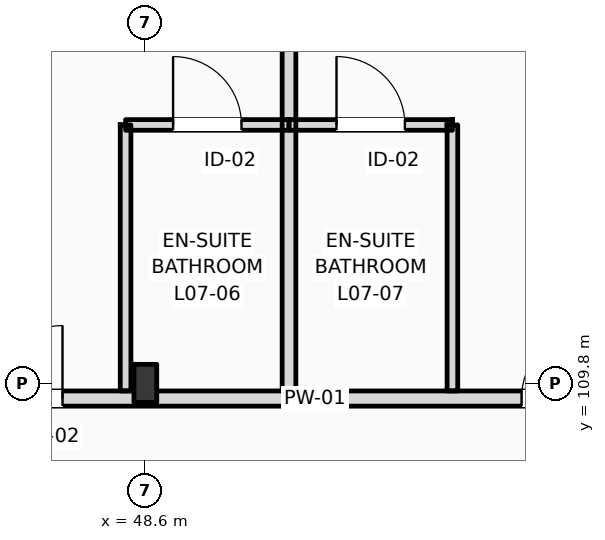
"""IFC4 building model, lengths in metres.
Left out: names, types, materials, properties, quantities, classifications, styles, units other than length and angle.
Written with IfcOpenShell. Run it as: python <this file> out.ifc"""

import sys

from ifc_helpers import new_model, si_unit, direction, frame, frame_2d, origin, origin_2d, place, context, subcontext, project, spatial, rectangle, i_section, extrude, element, fill, save


model = new_model("IFC4")
c1 = context("Model", 3, precision=1e-05, world=origin(), true_north=direction((0.0, 1.0)))
c2 = subcontext(c1, "Body", "Model", "MODEL_VIEW")
j1 = project(units=[si_unit("LENGTHUNIT", "METRE"), si_unit("PLANEANGLEUNIT", "RADIAN")], contexts=[c1])
p1 = place(None, origin())
s1 = spatial("IfcSite", under=j1, at=p1, CompositionType="ELEMENT")
p2 = place(p1, origin())
s2 = spatial("IfcBuilding", under=s1, at=p2, CompositionType="ELEMENT")
p3 = place(p2, frame((0.0, 0.0, 31.8)))
s3 = spatial("IfcBuildingStorey", under=s2, at=p3, CompositionType="ELEMENT", Elevation=31.8)
p4 = place(p3, frame((48.6, 109.8, 0.0), z_axis=(0.0, 0.0, 1.0), x_axis=(1.0, 0.0, 0.0)))
e1 = element("IfcColumn", 1, at=p4, inside=s3, PredefinedType="COLUMN", context=c2, shape_type="SweptSolid", body=[
    extrude(i_section(OverallWidth=0.3, OverallDepth=0.5, WebThickness=0.014, FlangeThickness=0.028, FilletRadius=0.027, at=origin_2d()), origin(), (0.0, 0.0, 1.0), 3.6),
])
p5 = place(p3, frame((10.65, 109.6, 0.0), z_axis=(0.0, 0.0, 1.0), x_axis=(1.0, 0.0, 0.0)))
e2 = element("IfcWall", 2, at=p5, inside=s3, PredefinedType="PARTITIONING", context=c2, shape_type="SweptSolid", body=[
    extrude(rectangle(XDim=109.21, YDim=0.2, at=frame_2d((54.605, 0.0))), origin(), (0.0, 0.0, 1.0), 2.72),
])
p6 = place(p5, frame((15.825, 0.0, 0.0)))
e3 = element("IfcOpeningElement", 3, at=p6, cuts=e2, PredefinedType="OPENING", context=c2, shape_type="SweptSolid", body=[
    extrude(rectangle(XDim=1.02, YDim=2.2, at=frame_2d((0.51, 1.1))), frame((0.0, 0.11, 0.0), z_axis=(0.0, -1.0, 0.0), x_axis=(1.0, 0.0, 0.0)), (0.0, 0.0, 1.0), 0.22),
])
p7 = place(p5, frame((19.87, 0.0, 0.0)))
e4 = element("IfcOpeningElement", 4, at=p7, cuts=e2, PredefinedType="OPENING", context=c2, shape_type="SweptSolid", body=[
    extrude(rectangle(XDim=1.02, YDim=2.2, at=frame_2d((0.51, 1.1))), frame((0.0, 0.11, 0.0), z_axis=(0.0, -1.0, 0.0), x_axis=(1.0, 0.0, 0.0)), (0.0, 0.0, 1.0), 0.22),
])
p8 = place(p5, frame((24.47, 0.0, 0.0)))
e5 = element("IfcOpeningElement", 5, at=p8, cuts=e2, PredefinedType="OPENING", context=c2, shape_type="SweptSolid", body=[
    extrude(rectangle(XDim=1.02, YDim=2.2, at=frame_2d((0.51, 1.1))), frame((0.0, 0.11, 0.0), z_axis=(0.0, -1.0, 0.0), x_axis=(1.0, 0.0, 0.0)), (0.0, 0.0, 1.0), 0.22),
])
p9 = place(p5, frame((26.92, 0.0, 0.0)))
e6 = element("IfcOpeningElement", 6, at=p9, cuts=e2, PredefinedType="OPENING", context=c2, shape_type="SweptSolid", body=[
    extrude(rectangle(XDim=1.02, YDim=2.2, at=frame_2d((0.51, 1.1))), frame((0.0, 0.11, 0.0), z_axis=(0.0, -1.0, 0.0), x_axis=(1.0, 0.0, 0.0)), (0.0, 0.0, 1.0), 0.22),
])
p10 = place(p5, frame((33.7, 0.0, 0.0)))
e7 = element("IfcOpeningElement", 7, at=p10, cuts=e2, PredefinedType="OPENING", context=c2, shape_type="SweptSolid", body=[
    extrude(rectangle(XDim=0.96, YDim=2.2, at=frame_2d((0.48, 1.1))), frame((0.0, 0.11, 0.0), z_axis=(0.0, -1.0, 0.0), x_axis=(1.0, 0.0, 0.0)), (0.0, 0.0, 1.0), 0.22),
])
p11 = place(p5, frame((35.9, 0.0, 0.0)))
e8 = element("IfcOpeningElement", 8, at=p11, cuts=e2, PredefinedType="OPENING", context=c2, shape_type="SweptSolid", body=[
    extrude(rectangle(XDim=0.96, YDim=2.2, at=frame_2d((0.48, 1.1))), frame((0.0, 0.11, 0.0), z_axis=(0.0, -1.0, 0.0), x_axis=(1.0, 0.0, 0.0)), (0.0, 0.0, 1.0), 0.22),
])
p12 = place(p5, frame((42.9, 0.0, 0.0)))
e9 = element("IfcOpeningElement", 9, at=p12, cuts=e2, PredefinedType="OPENING", context=c2, shape_type="SweptSolid", body=[
    extrude(rectangle(XDim=0.96, YDim=2.2, at=frame_2d((0.48, 1.1))), frame((0.0, 0.11, 0.0), z_axis=(0.0, -1.0, 0.0), x_axis=(1.0, 0.0, 0.0)), (0.0, 0.0, 1.0), 0.22),
])
p13 = place(p5, frame((47.5, 0.0, 0.0)))
e10 = element("IfcOpeningElement", 10, at=p13, cuts=e2, PredefinedType="OPENING", context=c2, shape_type="SweptSolid", body=[
    extrude(rectangle(XDim=0.96, YDim=2.2, at=frame_2d((0.48, 1.1))), frame((0.0, 0.11, 0.0), z_axis=(0.0, -1.0, 0.0), x_axis=(1.0, 0.0, 0.0)), (0.0, 0.0, 1.0), 0.22),
])
p14 = place(p5, frame((49.95, 0.0, 0.0)))
e11 = element("IfcOpeningElement", 11, at=p14, cuts=e2, PredefinedType="OPENING", context=c2, shape_type="SweptSolid", body=[
    extrude(rectangle(XDim=0.96, YDim=2.2, at=frame_2d((0.48, 1.1))), frame((0.0, 0.11, 0.0), z_axis=(0.0, -1.0, 0.0), x_axis=(1.0, 0.0, 0.0)), (0.0, 0.0, 1.0), 0.22),
])
p15 = place(p5, frame((56.7, 0.0, 0.0)))
e12 = element("IfcOpeningElement", 12, at=p15, cuts=e2, PredefinedType="OPENING", context=c2, shape_type="SweptSolid", body=[
    extrude(rectangle(XDim=0.96, YDim=2.2, at=frame_2d((0.48, 1.1))), frame((0.0, 0.11, 0.0), z_axis=(0.0, -1.0, 0.0), x_axis=(1.0, 0.0, 0.0)), (0.0, 0.0, 1.0), 0.22),
])
p16 = place(p5, frame((59.15, 0.0, 0.0)))
e13 = element("IfcOpeningElement", 13, at=p16, cuts=e2, PredefinedType="OPENING", context=c2, shape_type="SweptSolid", body=[
    extrude(rectangle(XDim=0.96, YDim=2.2, at=frame_2d((0.48, 1.1))), frame((0.0, 0.11, 0.0), z_axis=(0.0, -1.0, 0.0), x_axis=(1.0, 0.0, 0.0)), (0.0, 0.0, 1.0), 0.22),
])
p17 = place(p5, frame((65.9, 0.0, 0.0)))
e14 = element("IfcOpeningElement", 14, at=p17, cuts=e2, PredefinedType="OPENING", context=c2, shape_type="SweptSolid", body=[
    extrude(rectangle(XDim=0.96, YDim=2.2, at=frame_2d((0.48, 1.1))), frame((0.0, 0.11, 0.0), z_axis=(0.0, -1.0, 0.0), x_axis=(1.0, 0.0, 0.0)), (0.0, 0.0, 1.0), 0.22),
])
p18 = place(p5, frame((70.5, 0.0, 0.0)))
e15 = element("IfcOpeningElement", 15, at=p18, cuts=e2, PredefinedType="OPENING", context=c2, shape_type="SweptSolid", body=[
    extrude(rectangle(XDim=0.96, YDim=2.2, at=frame_2d((0.48, 1.1))), frame((0.0, 0.11, 0.0), z_axis=(0.0, -1.0, 0.0), x_axis=(1.0, 0.0, 0.0)), (0.0, 0.0, 1.0), 0.22),
])
p19 = place(p5, frame((72.95, 0.0, 0.0)))
e16 = element("IfcOpeningElement", 16, at=p19, cuts=e2, PredefinedType="OPENING", context=c2, shape_type="SweptSolid", body=[
    extrude(rectangle(XDim=0.96, YDim=2.2, at=frame_2d((0.48, 1.1))), frame((0.0, 0.11, 0.0), z_axis=(0.0, -1.0, 0.0), x_axis=(1.0, 0.0, 0.0)), (0.0, 0.0, 1.0), 0.22),
])
p20 = place(p5, frame((79.7, 0.0, 0.0)))
e17 = element("IfcOpeningElement", 17, at=p20, cuts=e2, PredefinedType="OPENING", context=c2, shape_type="SweptSolid", body=[
    extrude(rectangle(XDim=0.96, YDim=2.2, at=frame_2d((0.48, 1.1))), frame((0.0, 0.11, 0.0), z_axis=(0.0, -1.0, 0.0), x_axis=(1.0, 0.0, 0.0)), (0.0, 0.0, 1.0), 0.22),
])
p21 = place(p5, frame((82.15, 0.0, 0.0)))
e18 = element("IfcOpeningElement", 18, at=p21, cuts=e2, PredefinedType="OPENING", context=c2, shape_type="SweptSolid", body=[
    extrude(rectangle(XDim=0.96, YDim=2.2, at=frame_2d((0.48, 1.1))), frame((0.0, 0.11, 0.0), z_axis=(0.0, -1.0, 0.0), x_axis=(1.0, 0.0, 0.0)), (0.0, 0.0, 1.0), 0.22),
])
p22 = place(p5, frame((88.9, 0.0, 0.0)))
e19 = element("IfcOpeningElement", 19, at=p22, cuts=e2, PredefinedType="OPENING", context=c2, shape_type="SweptSolid", body=[
    extrude(rectangle(XDim=0.96, YDim=2.2, at=frame_2d((0.48, 1.1))), frame((0.0, 0.11, 0.0), z_axis=(0.0, -1.0, 0.0), x_axis=(1.0, 0.0, 0.0)), (0.0, 0.0, 1.0), 0.22),
])
p23 = place(p5, frame((93.75, 0.0, 0.0)))
e20 = element("IfcOpeningElement", 20, at=p23, cuts=e2, PredefinedType="OPENING", context=c2, shape_type="SweptSolid", body=[
    extrude(rectangle(XDim=0.96, YDim=2.2, at=frame_2d((0.48, 1.1))), frame((0.0, 0.11, 0.0), z_axis=(0.0, -1.0, 0.0), x_axis=(1.0, 0.0, 0.0)), (0.0, 0.0, 1.0), 0.22),
])
p24 = place(p5, frame((98.1, 0.0, 0.0)))
e21 = element("IfcOpeningElement", 21, at=p24, cuts=e2, PredefinedType="OPENING", context=c2, shape_type="SweptSolid", body=[
    extrude(rectangle(XDim=0.96, YDim=2.2, at=frame_2d((0.48, 1.1))), frame((0.0, 0.11, 0.0), z_axis=(0.0, -1.0, 0.0), x_axis=(1.0, 0.0, 0.0)), (0.0, 0.0, 1.0), 0.22),
])
p25 = place(p5, frame((102.7, 0.0, 0.0)))
e22 = element("IfcOpeningElement", 22, at=p25, cuts=e2, PredefinedType="OPENING", context=c2, shape_type="SweptSolid", body=[
    extrude(rectangle(XDim=0.96, YDim=2.2, at=frame_2d((0.48, 1.1))), frame((0.0, 0.11, 0.0), z_axis=(0.0, -1.0, 0.0), x_axis=(1.0, 0.0, 0.0)), (0.0, 0.0, 1.0), 0.22),
])
p26 = place(p5, frame((105.04, 0.0, 0.0)))
e23 = element("IfcOpeningElement", 23, at=p26, cuts=e2, PredefinedType="OPENING", context=c2, shape_type="SweptSolid", body=[
    extrude(rectangle(XDim=0.96, YDim=2.2, at=frame_2d((0.48, 1.1))), frame((0.0, 0.11, 0.0), z_axis=(0.0, -1.0, 0.0), x_axis=(1.0, 0.0, 0.0)), (0.0, 0.0, 1.0), 0.22),
])
p27 = place(p5, frame((2.716, 0.0, 0.0)))
e24 = element("IfcOpeningElement", 24, at=p27, cuts=e2, PredefinedType="OPENING", context=c2, shape_type="SweptSolid", body=[
    extrude(rectangle(XDim=1.35, YDim=2.25, at=frame_2d((0.675, 1.125))), frame((0.0, 0.11, 0.0), z_axis=(0.0, -1.0, 0.0), x_axis=(1.0, 0.0, 0.0)), (0.0, 0.0, 1.0), 0.22),
])
p28 = place(p5, frame((6.65, 0.0, 0.0)))
e25 = element("IfcOpeningElement", 25, at=p28, cuts=e2, PredefinedType="OPENING", context=c2, shape_type="SweptSolid", body=[
    extrude(rectangle(XDim=1.35, YDim=2.25, at=frame_2d((0.675, 1.125))), frame((0.0, 0.11, 0.0), z_axis=(0.0, -1.0, 0.0), x_axis=(1.0, 0.0, 0.0)), (0.0, 0.0, 1.0), 0.22),
])
p29 = place(p5, frame((10.583, 0.0, 0.0)))
e26 = element("IfcOpeningElement", 26, at=p29, cuts=e2, PredefinedType="OPENING", context=c2, shape_type="SweptSolid", body=[
    extrude(rectangle(XDim=1.35, YDim=2.25, at=frame_2d((0.675, 1.125))), frame((0.0, 0.11, 0.0), z_axis=(0.0, -1.0, 0.0), x_axis=(1.0, 0.0, 0.0)), (0.0, 0.0, 1.0), 0.22),
])
p30 = place(p3, frame((50.49, 109.7, 0.0), z_axis=(0.0, 0.0, 1.0), x_axis=(0.0, 1.0, 0.0)))
e27 = element("IfcWall", 27, at=p30, inside=s3, PredefinedType="PARTITIONING", context=c2, shape_type="SweptSolid", body=[
    extrude(rectangle(XDim=8.15, YDim=0.18, at=frame_2d((4.075, 0.0))), origin(), (0.0, 0.0, 1.0), 3.36),
])
p31 = place(p3, frame((48.34, 109.7, 0.0), z_axis=(0.0, 0.0, 1.0), x_axis=(0.0, 1.0, 0.0)))
e28 = element("IfcWall", 28, at=p31, inside=s3, PredefinedType="PARTITIONING", context=c2, shape_type="SweptSolid", body=[
    extrude(rectangle(XDim=3.5, YDim=0.14, at=frame_2d((1.75, 0.0))), origin(), (0.0, 0.0, 1.0), 3.36),
])
p32 = place(p3, frame((48.34, 113.2, 0.0), z_axis=(0.0, 0.0, 1.0), x_axis=(1.0, 0.0, 0.0)))
e29 = element("IfcWall", 29, at=p32, inside=s3, PredefinedType="PARTITIONING", context=c2, shape_type="SweptSolid", body=[
    extrude(rectangle(XDim=2.15, YDim=0.14, at=frame_2d((1.075, 0.0))), origin(), (0.0, 0.0, 1.0), 3.36),
])
p33 = place(p32, frame((0.625, 0.0, 0.0)))
e30 = element("IfcOpeningElement", 30, at=p33, cuts=e29, PredefinedType="OPENING", context=c2, shape_type="SweptSolid", body=[
    extrude(rectangle(XDim=0.9, YDim=2.1, at=frame_2d((0.45, 1.05))), frame((0.0, 0.08, 0.0), z_axis=(0.0, -1.0, 0.0), x_axis=(1.0, 0.0, 0.0)), (0.0, 0.0, 1.0), 0.16),
])
p34 = place(p3, frame((52.64, 109.7, 0.0), z_axis=(0.0, 0.0, 1.0), x_axis=(0.0, 1.0, 0.0)))
e31 = element("IfcWall", 31, at=p34, inside=s3, PredefinedType="PARTITIONING", context=c2, shape_type="SweptSolid", body=[
    extrude(rectangle(XDim=3.5, YDim=0.14, at=frame_2d((1.75, 0.0))), origin(), (0.0, 0.0, 1.0), 3.36),
])
p35 = place(p3, frame((50.49, 113.2, 0.0), z_axis=(0.0, 0.0, 1.0), x_axis=(1.0, 0.0, 0.0)))
e32 = element("IfcWall", 32, at=p35, inside=s3, PredefinedType="PARTITIONING", context=c2, shape_type="SweptSolid", body=[
    extrude(rectangle(XDim=2.15, YDim=0.14, at=frame_2d((1.075, 0.0))), origin(), (0.0, 0.0, 1.0), 3.36),
])
p36 = place(p35, frame((0.625, 0.0, 0.0)))
e33 = element("IfcOpeningElement", 33, at=p36, cuts=e32, PredefinedType="OPENING", context=c2, shape_type="SweptSolid", body=[
    extrude(rectangle(XDim=0.9, YDim=2.1, at=frame_2d((0.45, 1.05))), frame((0.0, 0.08, 0.0), z_axis=(0.0, -1.0, 0.0), x_axis=(1.0, 0.0, 0.0)), (0.0, 0.0, 1.0), 0.16),
])
p37 = place(p11, origin())
e34 = element("IfcDoor", 34, at=p37, inside=s3, OperationType="SINGLE_SWING_RIGHT", PredefinedType="DOOR", context=c2, shape_type="SweptSolid", body=[
    extrude(rectangle(XDim=0.96, YDim=2.2, at=frame_2d((0.48, 1.1))), frame((0.0, 0.025, 0.0), z_axis=(0.0, -1.0, 0.0), x_axis=(1.0, 0.0, 0.0)), (0.0, 0.0, 1.0), 0.05),
])
fill(e8, e34)
p38 = place(p33, origin())
e35 = element("IfcDoor", 35, at=p38, inside=s3, OperationType="SINGLE_SWING_LEFT", PredefinedType="DOOR", context=c2, shape_type="SweptSolid", body=[
    extrude(rectangle(XDim=0.9, YDim=2.1, at=frame_2d((0.45, 1.05))), frame((0.0, 0.025, 0.0), z_axis=(0.0, -1.0, 0.0), x_axis=(1.0, 0.0, 0.0)), (0.0, 0.0, 1.0), 0.05),
])
fill(e30, e35)
p39 = place(p12, origin())
e36 = element("IfcDoor", 36, at=p39, inside=s3, OperationType="SINGLE_SWING_RIGHT", PredefinedType="DOOR", context=c2, shape_type="SweptSolid", body=[
    extrude(rectangle(XDim=0.96, YDim=2.2, at=frame_2d((0.48, 1.1))), frame((0.0, 0.025, 0.0), z_axis=(0.0, -1.0, 0.0), x_axis=(1.0, 0.0, 0.0)), (0.0, 0.0, 1.0), 0.05),
])
fill(e9, e36)
p40 = place(p36, origin())
e37 = element("IfcDoor", 37, at=p40, inside=s3, OperationType="SINGLE_SWING_LEFT", PredefinedType="DOOR", context=c2, shape_type="SweptSolid", body=[
    extrude(rectangle(XDim=0.9, YDim=2.1, at=frame_2d((0.45, 1.05))), frame((0.0, 0.025, 0.0), z_axis=(0.0, -1.0, 0.0), x_axis=(1.0, 0.0, 0.0)), (0.0, 0.0, 1.0), 0.05),
])
fill(e33, e37)
save(model, sys.argv[1])
